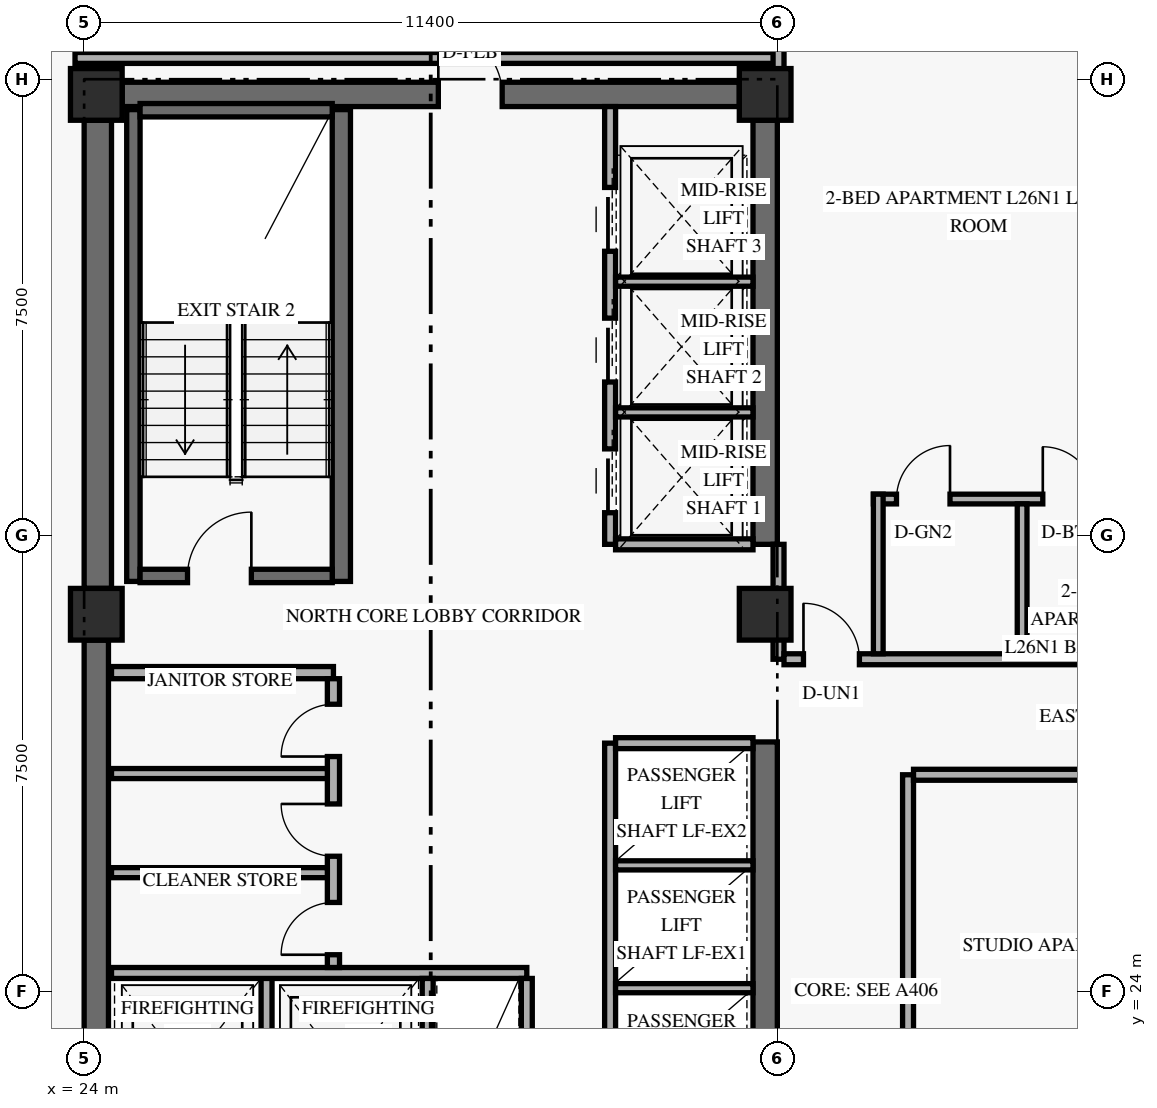
"""IFC4 building model, lengths in metres.
Left out: names, types, materials, properties, quantities, classifications, styles, units other than length and angle.
Written with IfcOpenShell. Run it as: python <this file> out.ifc"""

import sys

from ifc_helpers import new_model, si_unit, direction, frame, frame_2d, origin, origin_2d, place, context, subcontext, project, spatial, rectangle, extrude, element, fill, save


model = new_model("IFC4")
c1 = context("Model", 3, precision=1e-05, world=origin(), true_north=direction((0.0, 1.0)))
c2 = subcontext(c1, "Body", "Model", "MODEL_VIEW")
j1 = project(units=[si_unit("LENGTHUNIT", "METRE"), si_unit("PLANEANGLEUNIT", "RADIAN")], contexts=[c1])
p1 = place(None, origin())
s1 = spatial("IfcSite", under=j1, at=p1, CompositionType="ELEMENT")
p2 = place(p1, origin())
s2 = spatial("IfcBuilding", under=s1, at=p2, CompositionType="ELEMENT")
p3 = place(p2, frame((0.0, 0.0, 102.6)))
s3 = spatial("IfcBuildingStorey", under=s2, at=p3, CompositionType="ELEMENT", Elevation=102.6)
p4 = place(p3, frame((24.2, 17.975, 0.0), z_axis=(0.0, 0.0, 1.0), x_axis=(0.0, 1.0, 0.0)))
e1 = element("IfcWall", 1, at=p4, inside=s3, PredefinedType="SHEAR", context=c2, shape_type="SweptSolid", body=[
    extrude(rectangle(XDim=11.8, YDim=0.4, at=frame_2d((5.9, 0.0))), origin(), (0.0, 0.0, 1.0), 2.749),
])
p5 = place(p3, frame((24.225, 30.625, 0.0), z_axis=(0.0, 0.0, 1.0), x_axis=(0.0, 1.0, 0.0)))
e2 = element("IfcWall", 2, at=p5, inside=s3, PredefinedType="SHEAR", context=c2, shape_type="SweptSolid", body=[
    extrude(rectangle(XDim=7.7, YDim=0.45, at=frame_2d((3.85, 0.0))), origin(), (0.0, 0.0, 1.0), 2.749),
])
p6 = place(p3, frame((35.2, 17.975, 0.0), z_axis=(0.0, 0.0, 1.0), x_axis=(0.0, 1.0, 0.0)))
e3 = element("IfcWall", 3, at=p6, inside=s3, PredefinedType="SHEAR", context=c2, shape_type="SweptSolid", body=[
    extrude(rectangle(XDim=10.125, YDim=0.4, at=frame_2d((5.062, 0.0))), origin(), (0.0, 0.0, 1.0), 2.749),
])
p7 = place(p3, frame((35.2, 31.35, 0.0), z_axis=(0.0, 0.0, 1.0), x_axis=(0.0, 1.0, 0.0)))
e4 = element("IfcWall", 4, at=p7, inside=s3, PredefinedType="SHEAR", context=c2, shape_type="SweptSolid", body=[
    extrude(rectangle(XDim=6.975, YDim=0.4, at=frame_2d((3.487, 0.0))), origin(), (0.0, 0.0, 1.0), 2.749),
])
p8 = place(p3, frame((24.625, 38.75, 0.0), z_axis=(0.0, 0.0, 1.0), x_axis=(1.0, 0.0, 0.0)))
e5 = element("IfcWall", 5, at=p8, inside=s3, PredefinedType="SHEAR", context=c2, shape_type="SweptSolid", body=[
    extrude(rectangle(XDim=10.15, YDim=0.4, at=frame_2d((5.075, 0.0))), origin(), (0.0, 0.0, 1.0), 3.36),
])
p9 = place(p8, frame((5.2, 0.0, 0.0)))
e6 = element("IfcOpeningElement", 6, at=p9, cuts=e5, PredefinedType="OPENING", context=c2, shape_type="SweptSolid", body=[
    extrude(rectangle(XDim=1.05, YDim=2.15, at=frame_2d((0.525, 1.075))), frame((0.0, 0.21, 0.0), z_axis=(0.0, -1.0, 0.0), x_axis=(1.0, 0.0, 0.0)), (0.0, 0.0, 1.0), 0.42),
])
p10 = place(p3, frame((24.81, 30.74, 0.0), z_axis=(0.0, 0.0, 1.0), x_axis=(0.0, 1.0, 0.0)))
e7 = element("IfcWall", 7, at=p10, inside=s3, PredefinedType="SHEAR", context=c2, shape_type="SweptSolid", body=[
    extrude(rectangle(XDim=7.76, YDim=0.22, at=frame_2d((3.88, 0.0))), origin(), (0.0, 0.0, 1.0), 3.36),
])
p11 = place(p3, frame((28.23, 30.74, 0.0), z_axis=(0.0, 0.0, 1.0), x_axis=(0.0, 1.0, 0.0)))
e8 = element("IfcWall", 8, at=p11, inside=s3, PredefinedType="SHEAR", context=c2, shape_type="SweptSolid", body=[
    extrude(rectangle(XDim=7.76, YDim=0.3, at=frame_2d((3.88, 0.0))), origin(), (0.0, 0.0, 1.0), 3.36),
])
p12 = place(p3, frame((24.92, 30.83, 0.0), z_axis=(0.0, 0.0, 1.0), x_axis=(1.0, 0.0, 0.0)))
e9 = element("IfcWall", 9, at=p12, inside=s3, PredefinedType="SHEAR", context=c2, shape_type="SweptSolid", body=[
    extrude(rectangle(XDim=3.16, YDim=0.22, at=frame_2d((1.58, 0.0))), origin(), (0.0, 0.0, 1.0), 3.36),
])
p13 = place(p12, frame((0.78, 0.0, 0.0)))
e10 = element("IfcOpeningElement", 10, at=p13, cuts=e9, PredefinedType="OPENING", context=c2, shape_type="SweptSolid", body=[
    extrude(rectangle(XDim=1.05, YDim=2.15, at=frame_2d((0.525, 1.075))), frame((0.0, 0.12, 0.0), z_axis=(0.0, -1.0, 0.0), x_axis=(1.0, 0.0, 0.0)), (0.0, 0.0, 1.0), 0.24),
])
p14 = place(p3, frame((24.92, 38.49, 0.0), z_axis=(0.0, 0.0, 1.0), x_axis=(1.0, 0.0, 0.0)))
e11 = element("IfcWall", 11, at=p14, inside=s3, PredefinedType="SHEAR", context=c2, shape_type="SweptSolid", body=[
    extrude(rectangle(XDim=3.16, YDim=0.22, at=frame_2d((1.58, 0.0))), origin(), (0.0, 0.0, 1.0), 3.36),
])
for number, where, z_axis, x_axis in (
    (12, (24.2, 30.2, 0.0), (0.0, 0.0, 1.0), (1.0, 0.0, 0.0)),
    (13, (24.2, 38.75, 0.0), (0.0, 0.0, 1.0), (1.0, 0.0, 0.0)),
    (14, (35.2, 30.2, 0.0), (0.0, 0.0, 1.0), (1.0, 0.0, 0.0)),
    (15, (35.2, 38.75, 0.0), (0.0, 0.0, 1.0), (1.0, 0.0, 0.0)),
):
    element("IfcColumn", number, at=place(p3, frame(where, z_axis=z_axis, x_axis=x_axis)), inside=s3, PredefinedType="COLUMN", context=c2, shape_type="SweptSolid", body=[
        extrude(rectangle(XDim=0.85, YDim=0.85, at=origin_2d()), origin(), (0.0, 0.0, 1.0), 3.6),
    ])
p15 = place(p3, frame((27.0, 21.19, 0.0), z_axis=(0.0, 0.0, 1.0), x_axis=(0.0, 1.0, 0.0)))
e16 = element("IfcWall", 16, at=p15, inside=s3, PredefinedType="STANDARD", context=c2, shape_type="SweptSolid", body=[
    extrude(rectangle(XDim=3.11, YDim=0.18, at=frame_2d((1.555, 0.0))), origin(), (0.0, 0.0, 1.0), 3.36),
])
p16 = place(p3, frame((24.45, 24.3, 0.0), z_axis=(0.0, 0.0, 1.0), x_axis=(1.0, 0.0, 0.0)))
e17 = element("IfcWall", 17, at=p16, inside=s3, PredefinedType="STANDARD", context=c2, shape_type="SweptSolid", body=[
    extrude(rectangle(XDim=6.83, YDim=0.18, at=frame_2d((3.415, 0.0))), origin(), (0.0, 0.0, 1.0), 3.36),
])
for number, where, z_axis, x_axis in (
    (18, (29.65, 21.19, 0.0), (0.0, 0.0, 1.0), (0.0, 1.0, 0.0)),
    (19, (31.28, 21.19, 0.0), (0.0, 0.0, 1.0), (0.0, 1.0, 0.0)),
):
    element("IfcWall", number, at=place(p3, frame(where, z_axis=z_axis, x_axis=x_axis)), inside=s3, PredefinedType="STANDARD", context=c2, shape_type="SweptSolid", body=[
        extrude(rectangle(XDim=3.02, YDim=0.18, at=frame_2d((1.51, 0.0))), origin(), (0.0, 0.0, 1.0), 3.36),
    ])
p17 = place(p3, frame((24.45, 29.24, 0.0), z_axis=(0.0, 0.0, 1.0), x_axis=(1.0, 0.0, 0.0)))
e20 = element("IfcWall", 20, at=p17, inside=s3, PredefinedType="STANDARD", context=c2, shape_type="SweptSolid", body=[
    extrude(rectangle(XDim=3.65, YDim=0.2, at=frame_2d((1.825, 0.0))), origin(), (0.0, 0.0, 1.0), 3.36),
])
p18 = place(p3, frame((28.1, 24.39, 0.0), z_axis=(0.0, 0.0, 1.0), x_axis=(0.0, 1.0, 0.0)))
e21 = element("IfcWall", 21, at=p18, inside=s3, PredefinedType="STANDARD", context=c2, shape_type="SweptSolid", body=[
    extrude(rectangle(XDim=4.75, YDim=0.2, at=frame_2d((2.375, 0.0))), origin(), (0.0, 0.0, 1.0), 3.36),
])
p19 = place(p18, frame((0.21, 0.0, 0.0)))
e22 = element("IfcOpeningElement", 22, at=p19, cuts=e21, PredefinedType="OPENING", context=c2, shape_type="SweptSolid", body=[
    extrude(rectangle(XDim=0.86, YDim=2.1, at=frame_2d((0.43, 1.05))), frame((0.0, 0.11, 0.0), z_axis=(0.0, -1.0, 0.0), x_axis=(1.0, 0.0, 0.0)), (0.0, 0.0, 1.0), 0.22),
])
p20 = place(p18, frame((1.83, 0.0, 0.0)))
e23 = element("IfcOpeningElement", 23, at=p20, cuts=e21, PredefinedType="OPENING", context=c2, shape_type="SweptSolid", body=[
    extrude(rectangle(XDim=0.86, YDim=2.1, at=frame_2d((0.43, 1.05))), frame((0.0, 0.11, 0.0), z_axis=(0.0, -1.0, 0.0), x_axis=(1.0, 0.0, 0.0)), (0.0, 0.0, 1.0), 0.22),
])
p21 = place(p18, frame((3.47, 0.0, 0.0)))
e24 = element("IfcOpeningElement", 24, at=p21, cuts=e21, PredefinedType="OPENING", context=c2, shape_type="SweptSolid", body=[
    extrude(rectangle(XDim=0.86, YDim=2.1, at=frame_2d((0.43, 1.05))), frame((0.0, 0.11, 0.0), z_axis=(0.0, -1.0, 0.0), x_axis=(1.0, 0.0, 0.0)), (0.0, 0.0, 1.0), 0.22),
])
for number, where, z_axis, x_axis in (
    (25, (24.45, 25.95, 0.0), (0.0, 0.0, 1.0), (1.0, 0.0, 0.0)),
    (26, (24.45, 27.58, 0.0), (0.0, 0.0, 1.0), (1.0, 0.0, 0.0)),
):
    element("IfcWall", number, at=place(p3, frame(where, z_axis=z_axis, x_axis=x_axis)), inside=s3, PredefinedType="PARTITIONING", context=c2, shape_type="SweptSolid", body=[
        extrude(rectangle(XDim=3.55, YDim=0.165, at=frame_2d((1.775, 0.0))), origin(), (0.0, 0.0, 1.0), 3.36),
    ])
p22 = place(p3, frame((32.65, 18.02, 0.0), z_axis=(0.0, 0.0, 1.0), x_axis=(0.0, 1.0, 0.0)))
e27 = element("IfcWall", 27, at=p22, inside=s3, PredefinedType="STANDARD", context=c2, shape_type="SweptSolid", body=[
    extrude(rectangle(XDim=10.06, YDim=0.18, at=frame_2d((5.03, 0.0))), origin(), (0.0, 0.0, 1.0), 3.36),
])
p23 = place(p3, frame((32.74, 28.08, 0.0), z_axis=(0.0, 0.0, 1.0), x_axis=(1.0, 0.0, 0.0)))
e28 = element("IfcWall", 28, at=p23, inside=s3, PredefinedType="STANDARD", context=c2, shape_type="SweptSolid", body=[
    extrude(rectangle(XDim=2.26, YDim=0.18, at=frame_2d((1.13, 0.0))), origin(), (0.0, 0.0, 1.0), 3.36),
])
for number, where, z_axis, x_axis in (
    (29, (32.74, 24.05, 0.0), (0.0, 0.0, 1.0), (1.0, 0.0, 0.0)),
    (30, (32.74, 26.07, 0.0), (0.0, 0.0, 1.0), (1.0, 0.0, 0.0)),
):
    element("IfcWall", number, at=place(p3, frame(where, z_axis=z_axis, x_axis=x_axis)), inside=s3, PredefinedType="STANDARD", context=c2, shape_type="SweptSolid", body=[
        extrude(rectangle(XDim=2.26, YDim=0.15, at=frame_2d((1.13, 0.0))), origin(), (0.0, 0.0, 1.0), 3.36),
    ])
p24 = place(p3, frame((32.65, 31.35, 0.0), z_axis=(0.0, 0.0, 1.0), x_axis=(0.0, 1.0, 0.0)))
e31 = element("IfcWall", 31, at=p24, inside=s3, PredefinedType="STANDARD", context=c2, shape_type="SweptSolid", body=[
    extrude(rectangle(XDim=7.2, YDim=0.18, at=frame_2d((3.6, 0.0))), origin(), (0.0, 0.0, 1.0), 3.36),
])
p25 = place(p24, frame((0.52, 0.0, 0.0)))
e32 = element("IfcOpeningElement", 32, at=p25, cuts=e31, PredefinedType="OPENING", context=c2, shape_type="SweptSolid", body=[
    extrude(rectangle(XDim=1.05, YDim=2.2, at=frame_2d((0.525, 1.1))), frame((0.0, 0.1, 0.0), z_axis=(0.0, -1.0, 0.0), x_axis=(1.0, 0.0, 0.0)), (0.0, 0.0, 1.0), 0.2),
])
p26 = place(p24, frame((2.67, 0.0, 0.0)))
e33 = element("IfcOpeningElement", 33, at=p26, cuts=e31, PredefinedType="OPENING", context=c2, shape_type="SweptSolid", body=[
    extrude(rectangle(XDim=1.05, YDim=2.2, at=frame_2d((0.525, 1.1))), frame((0.0, 0.1, 0.0), z_axis=(0.0, -1.0, 0.0), x_axis=(1.0, 0.0, 0.0)), (0.0, 0.0, 1.0), 0.2),
])
p27 = place(p24, frame((4.82, 0.0, 0.0)))
e34 = element("IfcOpeningElement", 34, at=p27, cuts=e31, PredefinedType="OPENING", context=c2, shape_type="SweptSolid", body=[
    extrude(rectangle(XDim=1.05, YDim=2.2, at=frame_2d((0.525, 1.1))), frame((0.0, 0.1, 0.0), z_axis=(0.0, -1.0, 0.0), x_axis=(1.0, 0.0, 0.0)), (0.0, 0.0, 1.0), 0.2),
])
p28 = place(p3, frame((32.74, 31.35, 0.0), z_axis=(0.0, 0.0, 1.0), x_axis=(1.0, 0.0, 0.0)))
e35 = element("IfcWall", 35, at=p28, inside=s3, PredefinedType="STANDARD", context=c2, shape_type="SweptSolid", body=[
    extrude(rectangle(XDim=2.26, YDim=0.18, at=frame_2d((1.13, 0.0))), origin(), (0.0, 0.0, 1.0), 3.36),
])
for number, where, z_axis, x_axis in (
    (36, (32.74, 33.52, 0.0), (0.0, 0.0, 1.0), (1.0, 0.0, 0.0)),
    (37, (32.74, 35.67, 0.0), (0.0, 0.0, 1.0), (1.0, 0.0, 0.0)),
):
    element("IfcWall", number, at=place(p3, frame(where, z_axis=z_axis, x_axis=x_axis)), inside=s3, PredefinedType="STANDARD", context=c2, shape_type="SweptSolid", body=[
        extrude(rectangle(XDim=2.26, YDim=0.15, at=frame_2d((1.13, 0.0))), origin(), (0.0, 0.0, 1.0), 3.36),
    ])
p29 = place(p3, frame((37.55, 17.28, 0.0), z_axis=(0.0, 0.0, 1.0), x_axis=(0.0, 1.0, 0.0)))
e38 = element("IfcWall", 38, at=p29, inside=s3, PredefinedType="STANDARD", context=c2, shape_type="SweptSolid", body=[
    extrude(rectangle(XDim=10.28, YDim=0.18, at=frame_2d((5.14, 0.0))), origin(), (0.0, 0.0, 1.0), 2.731),
])
p30 = place(p29, frame((5.0, 0.0, 0.0)))
e39 = element("IfcOpeningElement", 39, at=p30, cuts=e38, PredefinedType="OPENING", context=c2, shape_type="SweptSolid", body=[
    extrude(rectangle(XDim=0.92, YDim=2.15, at=frame_2d((0.46, 1.075))), frame((0.0, 0.1, 0.0), z_axis=(0.0, -1.0, 0.0), x_axis=(1.0, 0.0, 0.0)), (0.0, 0.0, 1.0), 0.2),
])
p31 = place(p3, frame((37.64, 27.56, 0.0), z_axis=(0.0, 0.0, 1.0), x_axis=(1.0, 0.0, 0.0)))
e40 = element("IfcWall", 40, at=p31, inside=s3, PredefinedType="STANDARD", context=c2, shape_type="SweptSolid", body=[
    extrude(rectangle(XDim=8.96, YDim=0.18, at=frame_2d((4.48, 0.0))), origin(), (0.0, 0.0, 1.0), 2.731),
])
p32 = place(p3, frame((35.42, 29.46, 0.0), z_axis=(0.0, 0.0, 1.0), x_axis=(0.0, 1.0, 0.0)))
e41 = element("IfcWall", 41, at=p32, inside=s3, PredefinedType="STANDARD", context=c2, shape_type="SweptSolid", body=[
    extrude(rectangle(XDim=1.89, YDim=0.18, at=frame_2d((0.945, 0.0))), origin(), (0.0, 0.0, 1.0), 2.731),
])
p33 = place(p3, frame((35.51, 29.46, 0.0), z_axis=(0.0, 0.0, 1.0), x_axis=(1.0, 0.0, 0.0)))
e42 = element("IfcWall", 42, at=p33, inside=s3, PredefinedType="STANDARD", context=c2, shape_type="SweptSolid", body=[
    extrude(rectangle(XDim=11.09, YDim=0.18, at=frame_2d((5.545, 0.0))), origin(), (0.0, 0.0, 1.0), 2.731),
])
p34 = place(p33, frame((0.32, 0.0, 0.0)))
e43 = element("IfcOpeningElement", 43, at=p34, cuts=e42, PredefinedType="OPENING", context=c2, shape_type="SweptSolid", body=[
    extrude(rectangle(XDim=0.92, YDim=2.15, at=frame_2d((0.46, 1.075))), frame((0.0, 0.1, 0.0), z_axis=(0.0, -1.0, 0.0), x_axis=(1.0, 0.0, 0.0)), (0.0, 0.0, 1.0), 0.2),
])
p35 = place(p3, frame((23.85, 39.35, 0.0), z_axis=(0.0, 0.0, 1.0), x_axis=(1.0, 0.0, 0.0)))
e44 = element("IfcWall", 44, at=p35, inside=s3, PredefinedType="STANDARD", context=c2, shape_type="SweptSolid", body=[
    extrude(rectangle(XDim=11.57, YDim=0.18, at=frame_2d((5.785, 0.0))), origin(), (0.0, 0.0, 1.0), 2.731),
])
p36 = place(p3, frame((35.42, 38.75, 0.0), z_axis=(0.0, 0.0, 1.0), x_axis=(0.0, 1.0, 0.0)))
e45 = element("IfcWall", 45, at=p36, inside=s3, PredefinedType="PARTITIONING", context=c2, shape_type="SweptSolid", body=[
    extrude(rectangle(XDim=6.27, YDim=0.18, at=frame_2d((3.135, 0.0))), origin(), (0.0, 0.0, 1.0), 2.731),
])
p37 = place(p3, frame((36.98, 32.095, 0.0), z_axis=(0.0, 0.0, 1.0), x_axis=(1.0, 0.0, 0.0)))
e46 = element("IfcWall", 46, at=p37, inside=s3, PredefinedType="PLUMBINGWALL", context=c2, shape_type="SweptSolid", body=[
    extrude(rectangle(XDim=4.71, YDim=0.16, at=frame_2d((2.355, 0.0))), origin(), (0.0, 0.0, 1.0), 3.36),
])
p38 = place(p37, frame((0.38, 0.0, 0.0)))
e47 = element("IfcOpeningElement", 47, at=p38, cuts=e46, PredefinedType="OPENING", context=c2, shape_type="SweptSolid", body=[
    extrude(rectangle(XDim=0.88, YDim=2.12, at=frame_2d((0.44, 1.06))), frame((0.0, 0.09, 0.0), z_axis=(0.0, -1.0, 0.0), x_axis=(1.0, 0.0, 0.0)), (0.0, 0.0, 1.0), 0.18),
])
p39 = place(p37, frame((2.786, 0.0, 0.0)))
e48 = element("IfcOpeningElement", 48, at=p39, cuts=e46, PredefinedType="OPENING", context=c2, shape_type="SweptSolid", body=[
    extrude(rectangle(XDim=0.86, YDim=2.12, at=frame_2d((0.43, 1.06))), frame((0.0, 0.09, 0.0), z_axis=(0.0, -1.0, 0.0), x_axis=(1.0, 0.0, 0.0)), (0.0, 0.0, 1.0), 0.18),
])
p40 = place(p3, frame((37.06, 29.55, 0.0), z_axis=(0.0, 0.0, 1.0), x_axis=(0.0, 1.0, 0.0)))
e49 = element("IfcWall", 49, at=p40, inside=s3, PredefinedType="PLUMBINGWALL", context=c2, shape_type="SweptSolid", body=[
    extrude(rectangle(XDim=2.625, YDim=0.16, at=frame_2d((1.312, 0.0))), origin(), (0.0, 0.0, 1.0), 2.731),
])
p41 = place(p3, frame((39.426, 29.55, 0.0), z_axis=(0.0, 0.0, 1.0), x_axis=(0.0, 1.0, 0.0)))
e50 = element("IfcWall", 50, at=p41, inside=s3, PredefinedType="PLUMBINGWALL", context=c2, shape_type="SweptSolid", body=[
    extrude(rectangle(XDim=2.465, YDim=0.16, at=frame_2d((1.232, 0.0))), origin(), (0.0, 0.0, 1.0), 2.731),
])
p42 = place(p13, origin())
e51 = element("IfcDoor", 51, at=p42, inside=s3, OperationType="SINGLE_SWING_RIGHT", PredefinedType="DOOR", context=c2, shape_type="SweptSolid", body=[
    extrude(rectangle(XDim=1.05, YDim=2.15, at=frame_2d((0.525, 1.075))), frame((0.0, 0.025, 0.0), z_axis=(0.0, -1.0, 0.0), x_axis=(1.0, 0.0, 0.0)), (0.0, 0.0, 1.0), 0.05),
])
fill(e10, e51)
p43 = place(p19, origin())
e52 = element("IfcDoor", 52, at=p43, inside=s3, OperationType="SINGLE_SWING_LEFT", PredefinedType="DOOR", context=c2, shape_type="SweptSolid", body=[
    extrude(rectangle(XDim=0.86, YDim=2.1, at=frame_2d((0.43, 1.05))), frame((0.0, 0.025, 0.0), z_axis=(0.0, -1.0, 0.0), x_axis=(1.0, 0.0, 0.0)), (0.0, 0.0, 1.0), 0.05),
])
fill(e22, e52)
p44 = place(p20, origin())
e53 = element("IfcDoor", 53, at=p44, inside=s3, OperationType="SINGLE_SWING_RIGHT", PredefinedType="DOOR", context=c2, shape_type="SweptSolid", body=[
    extrude(rectangle(XDim=0.86, YDim=2.1, at=frame_2d((0.43, 1.05))), frame((0.0, 0.025, 0.0), z_axis=(0.0, -1.0, 0.0), x_axis=(1.0, 0.0, 0.0)), (0.0, 0.0, 1.0), 0.05),
])
fill(e23, e53)
p45 = place(p21, origin())
e54 = element("IfcDoor", 54, at=p45, inside=s3, OperationType="SINGLE_SWING_LEFT", PredefinedType="DOOR", context=c2, shape_type="SweptSolid", body=[
    extrude(rectangle(XDim=0.86, YDim=2.1, at=frame_2d((0.43, 1.05))), frame((0.0, 0.025, 0.0), z_axis=(0.0, -1.0, 0.0), x_axis=(1.0, 0.0, 0.0)), (0.0, 0.0, 1.0), 0.05),
])
fill(e24, e54)
p46 = place(p25, origin())
e55 = element("IfcDoor", 55, at=p46, inside=s3, OperationType="SLIDING_TO_LEFT", PredefinedType="DOOR", context=c2, shape_type="SweptSolid", body=[
    extrude(rectangle(XDim=1.05, YDim=2.2, at=frame_2d((0.525, 1.1))), frame((0.0, 0.025, 0.0), z_axis=(0.0, -1.0, 0.0), x_axis=(1.0, 0.0, 0.0)), (0.0, 0.0, 1.0), 0.05),
])
fill(e32, e55)
p47 = place(p26, origin())
e56 = element("IfcDoor", 56, at=p47, inside=s3, OperationType="SLIDING_TO_LEFT", PredefinedType="DOOR", context=c2, shape_type="SweptSolid", body=[
    extrude(rectangle(XDim=1.05, YDim=2.2, at=frame_2d((0.525, 1.1))), frame((0.0, 0.025, 0.0), z_axis=(0.0, -1.0, 0.0), x_axis=(1.0, 0.0, 0.0)), (0.0, 0.0, 1.0), 0.05),
])
fill(e33, e56)
p48 = place(p27, origin())
e57 = element("IfcDoor", 57, at=p48, inside=s3, OperationType="SLIDING_TO_LEFT", PredefinedType="DOOR", context=c2, shape_type="SweptSolid", body=[
    extrude(rectangle(XDim=1.05, YDim=2.2, at=frame_2d((0.525, 1.1))), frame((0.0, 0.025, 0.0), z_axis=(0.0, -1.0, 0.0), x_axis=(1.0, 0.0, 0.0)), (0.0, 0.0, 1.0), 0.05),
])
fill(e34, e57)
p49 = place(p9, frame((1.05, 0.0, 0.0), z_axis=(0.0, 0.0, 1.0), x_axis=(-1.0, 0.0, 0.0)))
e58 = element("IfcDoor", 58, at=p49, inside=s3, OperationType="SINGLE_SWING_RIGHT", PredefinedType="DOOR", context=c2, shape_type="SweptSolid", body=[
    extrude(rectangle(XDim=1.05, YDim=2.15, at=frame_2d((0.525, 1.075))), frame((0.0, 0.025, 0.0), z_axis=(0.0, -1.0, 0.0), x_axis=(1.0, 0.0, 0.0)), (0.0, 0.0, 1.0), 0.05),
])
fill(e6, e58)
p50 = place(p34, origin())
e59 = element("IfcDoor", 59, at=p50, inside=s3, OperationType="SINGLE_SWING_LEFT", PredefinedType="DOOR", context=c2, shape_type="SweptSolid", body=[
    extrude(rectangle(XDim=0.92, YDim=2.15, at=frame_2d((0.46, 1.075))), frame((0.0, 0.025, 0.0), z_axis=(0.0, -1.0, 0.0), x_axis=(1.0, 0.0, 0.0)), (0.0, 0.0, 1.0), 0.05),
])
fill(e43, e59)
p51 = place(p38, origin())
e60 = element("IfcDoor", 60, at=p51, inside=s3, OperationType="SINGLE_SWING_RIGHT", PredefinedType="DOOR", context=c2, shape_type="SweptSolid", body=[
    extrude(rectangle(XDim=0.88, YDim=2.12, at=frame_2d((0.44, 1.06))), frame((0.0, 0.025, 0.0), z_axis=(0.0, -1.0, 0.0), x_axis=(1.0, 0.0, 0.0)), (0.0, 0.0, 1.0), 0.05),
])
fill(e47, e60)
p52 = place(p39, origin())
e61 = element("IfcDoor", 61, at=p52, inside=s3, OperationType="SINGLE_SWING_LEFT", PredefinedType="DOOR", context=c2, shape_type="SweptSolid", body=[
    extrude(rectangle(XDim=0.86, YDim=2.12, at=frame_2d((0.43, 1.06))), frame((0.0, 0.025, 0.0), z_axis=(0.0, -1.0, 0.0), x_axis=(1.0, 0.0, 0.0)), (0.0, 0.0, 1.0), 0.05),
])
fill(e48, e61)
save(model, sys.argv[1])
